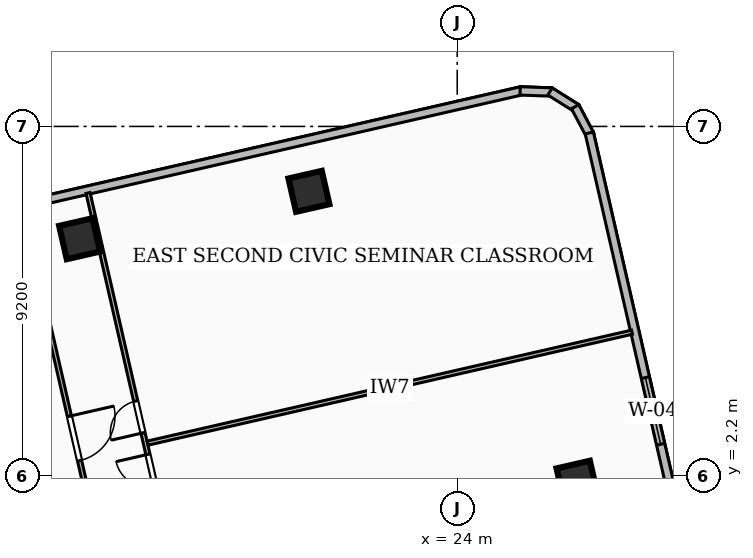
"""IFC4 building model, lengths in metres.
Left out: names, types, materials, properties, quantities, classifications, styles, units other than length and angle.
Written with IfcOpenShell. Run it as: python <this file> out.ifc"""

import sys

from ifc_helpers import new_model, si_unit, direction, frame, frame_2d, origin, origin_2d, place, context, subcontext, project, spatial, rectangle, extrude, element, fill, save


model = new_model("IFC4")
c1 = context("Model", 3, precision=1e-05, world=origin(), true_north=direction((0.0, 1.0)))
c2 = subcontext(c1, "Body", "Model", "MODEL_VIEW")
j1 = project(units=[si_unit("LENGTHUNIT", "METRE"), si_unit("PLANEANGLEUNIT", "RADIAN")], contexts=[c1])
p1 = place(None, origin())
s1 = spatial("IfcSite", under=j1, at=p1, CompositionType="ELEMENT")
p2 = place(p1, origin())
s2 = spatial("IfcBuilding", under=s1, at=p2, CompositionType="ELEMENT")
p3 = place(p2, frame((0.0, 0.0, 123.48)))
s3 = spatial("IfcBuildingStorey", under=s2, at=p3, CompositionType="ELEMENT", Elevation=123.48)
for number, where, z_axis, x_axis in (
    (1, (14.064, 8.445, 0.0), (0.0, 0.0, 1.0), (0.975, 0.223, 0.0)),
    (2, (27.153, 2.064, 0.0), (0.0, 0.0, 1.0), (0.975, 0.223, 0.0)),
    (3, (20.098, 9.692, 0.0), (0.0, 0.0, 1.0), (0.975, 0.223, 0.0)),
):
    element("IfcColumn", number, at=place(p3, frame(where, z_axis=z_axis, x_axis=x_axis)), inside=s3, PredefinedType="COLUMN", context=c2, shape_type="SweptSolid", body=[
        extrude(rectangle(XDim=0.9, YDim=0.9, at=origin_2d()), origin(), (0.0, 0.0, 1.0), 3.6),
    ])
p4 = place(p3, frame((12.585, 9.335, 0.0), z_axis=(0.0, 0.0, 1.0), x_axis=(0.974754036658, 0.223281365141, 0.0)))
e4 = element("IfcWall", 4, at=p4, inside=s3, PredefinedType="SOLIDWALL", context=c2, shape_type="SweptSolid", body=[
    extrude(rectangle(XDim=13.459, YDim=0.22, at=frame_2d((6.729, 0.0))), origin(), (0.0, 0.0, 1.0), 2.644),
])
p5 = place(p3, frame((25.655, 12.335, 0.0), z_axis=(0.0, 0.0, 1.0), x_axis=(0.999352376715, -0.035983706773, 0.0)))
e5 = element("IfcWall", 5, at=p5, inside=s3, PredefinedType="SOLIDWALL", context=c2, shape_type="SweptSolid", body=[
    extrude(rectangle(XDim=0.834, YDim=0.22, at=frame_2d((0.417, 0.0))), origin(), (0.0, 0.0, 1.0), 3.34),
])
p6 = place(p3, frame((26.443, 12.319, 0.0), z_axis=(0.0, 0.0, 1.0), x_axis=(0.846889988853, -0.531768132536, 0.0)))
e6 = element("IfcWall", 6, at=p6, inside=s3, PredefinedType="SOLIDWALL", context=c2, shape_type="SweptSolid", body=[
    extrude(rectangle(XDim=0.818, YDim=0.22, at=frame_2d((0.409, 0.0))), origin(), (0.0, 0.0, 1.0), 3.34),
])
p7 = place(p3, frame((27.103, 11.919, 0.0), z_axis=(0.0, 0.0, 1.0), x_axis=(0.468506090516, -0.883460266876, 0.0)))
e7 = element("IfcWall", 7, at=p7, inside=s3, PredefinedType="SOLIDWALL", context=c2, shape_type="SweptSolid", body=[
    extrude(rectangle(XDim=0.834, YDim=0.22, at=frame_2d((0.417, 0.0))), origin(), (0.0, 0.0, 1.0), 3.34),
])
p8 = place(p3, frame((27.476, 11.228, 0.0), z_axis=(0.0, 0.0, 1.0), x_axis=(0.223358074049, -0.974736462208, 0.0)))
e8 = element("IfcWall", 8, at=p8, inside=s3, PredefinedType="SOLIDWALL", context=c2, shape_type="SweptSolid", body=[
    extrude(rectangle(XDim=9.621, YDim=0.22, at=frame_2d((4.811, 0.0))), origin(), (0.0, 0.0, 1.0), 3.34),
])
p9 = place(p8, frame((6.604, 0.0, 0.85)))
e9 = element("IfcOpeningElement", 9, at=p9, cuts=e8, PredefinedType="OPENING", context=c2, shape_type="SweptSolid", body=[
    extrude(rectangle(XDim=1.8, YDim=2.0, at=frame_2d((0.9, 1.0))), frame((0.0, 0.12, 0.0), z_axis=(0.0, -1.0, 0.0), x_axis=(1.0, 0.0, 0.0)), (0.0, 0.0, 1.0), 0.24),
])
p10 = place(p3, frame((11.692, 12.957, 0.0), z_axis=(0.0, 0.0, 1.0), x_axis=(0.223262093598, -0.97475845088, 0.0)))
e10 = element("IfcWall", 10, at=p10, inside=s3, PredefinedType="PARTITIONING", context=c2, shape_type="SweptSolid", body=[
    extrude(rectangle(XDim=20.04, YDim=0.11, at=frame_2d((10.02, 0.0))), origin(), (0.0, 0.0, 1.0), 2.57),
])
p11 = place(p10, frame((9.42, 0.0, 0.0)))
e11 = element("IfcOpeningElement", 11, at=p11, cuts=e10, PredefinedType="OPENING", context=c2, shape_type="SweptSolid", body=[
    extrude(rectangle(XDim=1.2, YDim=2.1, at=frame_2d((0.6, 1.05))), frame((0.0, 0.065, 0.0), z_axis=(0.0, -1.0, 0.0), x_axis=(1.0, 0.0, 0.0)), (0.0, 0.0, 1.0), 0.13),
])
p12 = place(p3, frame((15.855, 3.067, 0.0), z_axis=(0.0, 0.0, 1.0), x_axis=(0.974758398925, 0.223262320434, 0.0)))
e12 = element("IfcWall", 12, at=p12, inside=s3, PredefinedType="PARTITIONING", context=c2, shape_type="SweptSolid", body=[
    extrude(rectangle(XDim=13.075, YDim=0.11, at=frame_2d((6.538, 0.0))), origin(), (0.0, 0.0, 1.0), 2.72),
])
p13 = place(p3, frame((17.062, -2.468, 0.0), z_axis=(0.0, 0.0, 1.0), x_axis=(-0.223341555051, 0.974740247341, 0.0)))
e13 = element("IfcWall", 13, at=p13, inside=s3, PredefinedType="PARTITIONING", context=c2, shape_type="SweptSolid", body=[
    extrude(rectangle(XDim=12.43, YDim=0.11, at=frame_2d((6.215, 0.0))), origin(), (0.0, 0.0, 1.0), 2.57),
])
p14 = place(p13, frame((4.515, 0.0, 0.0)))
e14 = element("IfcOpeningElement", 14, at=p14, cuts=e13, PredefinedType="OPENING", context=c2, shape_type="SweptSolid", body=[
    extrude(rectangle(XDim=0.86, YDim=2.04, at=frame_2d((0.43, 1.02))), frame((0.0, 0.065, 0.0), z_axis=(0.0, -1.0, 0.0), x_axis=(1.0, 0.0, 0.0)), (0.0, 0.0, 1.0), 0.13),
])
p15 = place(p13, frame((5.955, 0.0, 0.0)))
e15 = element("IfcOpeningElement", 15, at=p15, cuts=e13, PredefinedType="OPENING", context=c2, shape_type="SweptSolid", body=[
    extrude(rectangle(XDim=0.86, YDim=2.04, at=frame_2d((0.43, 1.02))), frame((0.0, 0.065, 0.0), z_axis=(0.0, -1.0, 0.0), x_axis=(1.0, 0.0, 0.0)), (0.0, 0.0, 1.0), 0.13),
])
p16 = place(p9, origin())
e16 = element("IfcWindow", 16, at=p16, inside=s3, PartitioningType="SINGLE_PANEL", PredefinedType="WINDOW", context=c2, shape_type="SweptSolid", body=[
    extrude(rectangle(XDim=1.8, YDim=2.0, at=frame_2d((0.9, 1.0))), frame((0.0, 0.03, 0.0), z_axis=(0.0, -1.0, 0.0), x_axis=(1.0, 0.0, 0.0)), (0.0, 0.0, 1.0), 0.06),
])
fill(e9, e16)
p17 = place(p11, origin())
e17 = element("IfcDoor", 17, at=p17, inside=s3, OperationType="SINGLE_SWING_LEFT", PredefinedType="DOOR", context=c2, shape_type="SweptSolid", body=[
    extrude(rectangle(XDim=1.2, YDim=2.1, at=frame_2d((0.6, 1.05))), frame((0.0, 0.025, 0.0), z_axis=(0.0, -1.0, 0.0), x_axis=(1.0, 0.0, 0.0)), (0.0, 0.0, 1.0), 0.05),
])
fill(e11, e17)
p18 = place(p14, origin())
e18 = element("IfcDoor", 18, at=p18, inside=s3, OperationType="SINGLE_SWING_RIGHT", PredefinedType="DOOR", context=c2, shape_type="SweptSolid", body=[
    extrude(rectangle(XDim=0.86, YDim=2.04, at=frame_2d((0.43, 1.02))), frame((0.0, 0.025, 0.0), z_axis=(0.0, -1.0, 0.0), x_axis=(1.0, 0.0, 0.0)), (0.0, 0.0, 1.0), 0.05),
])
fill(e14, e18)
p19 = place(p15, origin())
e19 = element("IfcDoor", 19, at=p19, inside=s3, OperationType="SINGLE_SWING_LEFT", PredefinedType="DOOR", context=c2, shape_type="SweptSolid", body=[
    extrude(rectangle(XDim=0.86, YDim=2.04, at=frame_2d((0.43, 1.02))), frame((0.0, 0.025, 0.0), z_axis=(0.0, -1.0, 0.0), x_axis=(1.0, 0.0, 0.0)), (0.0, 0.0, 1.0), 0.05),
])
fill(e15, e19)
save(model, sys.argv[1])
